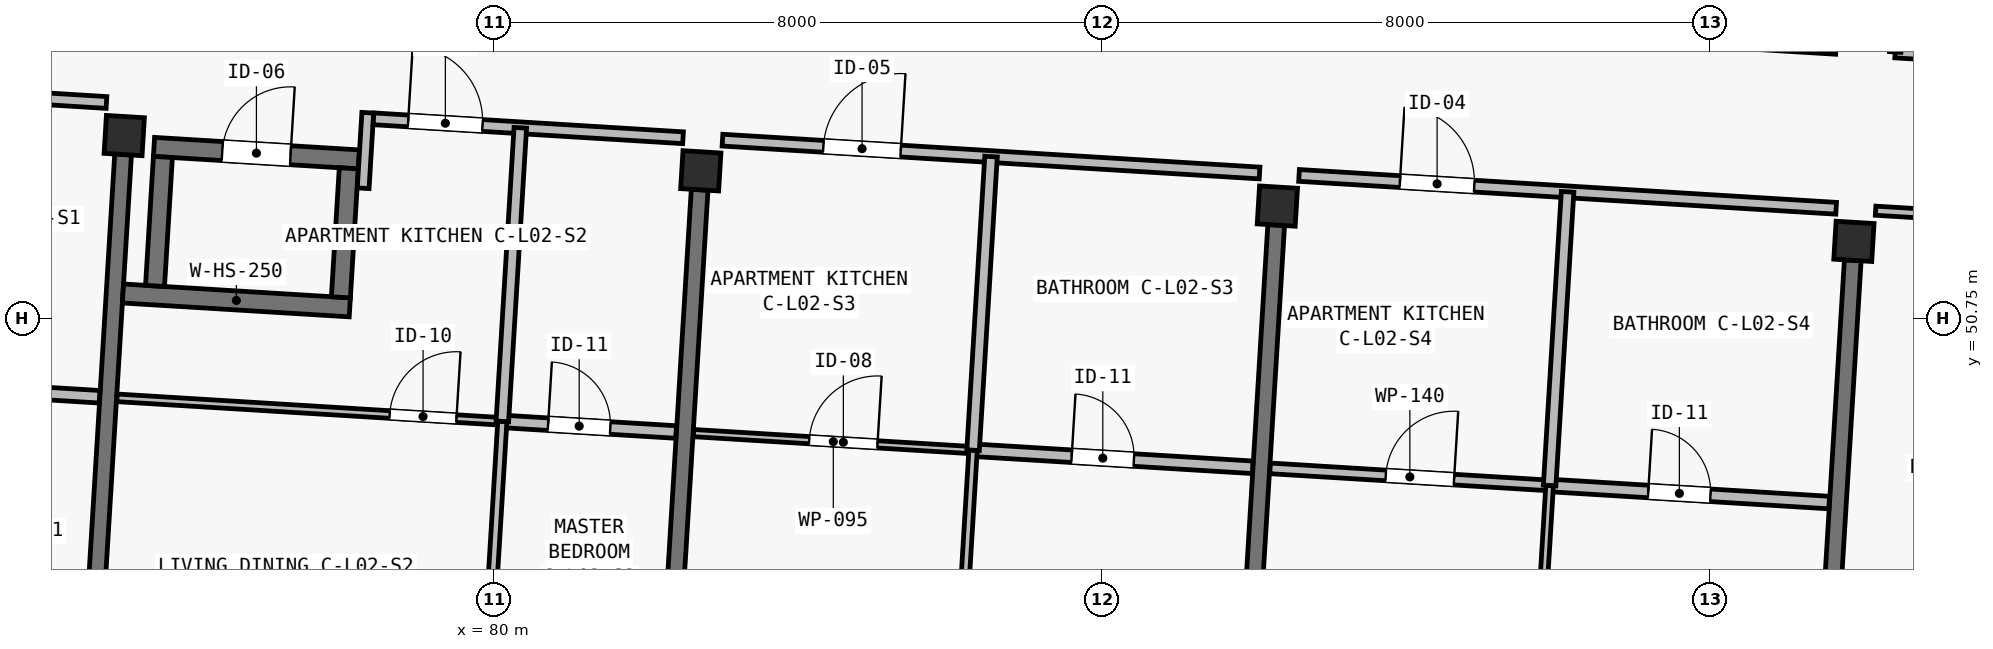
"""IFC4 building model, lengths in metres.
Left out: names, types, materials, properties, quantities, classifications, styles, units other than length and angle.
Written with IfcOpenShell. Run it as: python <this file> out.ifc"""

import sys

from ifc_helpers import new_model, si_unit, direction, frame, frame_2d, origin, origin_2d, place, context, subcontext, project, spatial, rectangle, extrude, element, fill, save


model = new_model("IFC4")
c1 = context("Model", 3, precision=1e-05, world=origin(), true_north=direction((0.0, 1.0)))
c2 = subcontext(c1, "Body", "Model", "MODEL_VIEW")
j1 = project(units=[si_unit("LENGTHUNIT", "METRE"), si_unit("PLANEANGLEUNIT", "RADIAN")], contexts=[c1])
p1 = place(None, origin())
s1 = spatial("IfcSite", under=j1, at=p1, CompositionType="ELEMENT")
p2 = place(p1, origin())
s2 = spatial("IfcBuilding", under=s1, at=p2, CompositionType="ELEMENT")
p3 = place(p2, frame((0.0, 0.0, 8.4)))
s3 = spatial("IfcBuildingStorey", under=s2, at=p3, CompositionType="ELEMENT", Elevation=8.4)
for number, where, z_axis, x_axis in (
    (1, (75.135, 53.158, 0.0), (0.0, 0.0, 1.0), (0.998, -0.061, 0.0)),
    (2, (82.721, 52.694, 0.0), (0.0, 0.0, 1.0), (0.998, -0.061, 0.0)),
    (3, (90.307, 52.23, 0.0), (0.0, 0.0, 1.0), (0.998, -0.061, 0.0)),
    (4, (97.893, 51.766, 0.0), (0.0, 0.0, 1.0), (0.998, -0.061, 0.0)),
):
    element("IfcColumn", number, at=place(p3, frame(where, z_axis=z_axis, x_axis=x_axis)), inside=s3, PredefinedType="COLUMN", context=c2, shape_type="SweptSolid", body=[
        extrude(rectangle(XDim=0.5, YDim=0.5, at=origin_2d()), origin(), (0.0, 0.0, 1.0), 3.25),
    ])
p4 = place(p3, frame((74.687, 45.822, 0.0), z_axis=(0.0, 0.0, 1.0), x_axis=(0.061033859059, 0.99813569621, 0.0)))
e5 = element("IfcWall", 5, at=p4, inside=s3, PredefinedType="SHEAR", context=c2, shape_type="SweptSolid", body=[
    extrude(rectangle(XDim=7.1, YDim=0.22, at=frame_2d((3.55, 0.0))), origin(), (0.0, 0.0, 1.0), 2.5),
])
p5 = place(p3, frame((82.273, 45.358, 0.0), z_axis=(0.0, 0.0, 1.0), x_axis=(0.061070212127, 0.998133472633, 0.0)))
e6 = element("IfcWall", 6, at=p5, inside=s3, PredefinedType="SHEAR", context=c2, shape_type="SweptSolid", body=[
    extrude(rectangle(XDim=7.1, YDim=0.22, at=frame_2d((3.55, 0.0))), origin(), (0.0, 0.0, 1.0), 2.5),
])
p6 = place(p3, frame((89.859, 44.894, 0.0), z_axis=(0.0, 0.0, 1.0), x_axis=(0.061033859059, 0.99813569621, 0.0)))
e7 = element("IfcWall", 7, at=p6, inside=s3, PredefinedType="SHEAR", context=c2, shape_type="SweptSolid", body=[
    extrude(rectangle(XDim=7.1, YDim=0.22, at=frame_2d((3.55, 0.0))), origin(), (0.0, 0.0, 1.0), 2.5),
])
p7 = place(p3, frame((97.444, 44.43, 0.0), z_axis=(0.0, 0.0, 1.0), x_axis=(0.061070212127, 0.998133472633, 0.0)))
e8 = element("IfcWall", 8, at=p7, inside=s3, PredefinedType="SHEAR", context=c2, shape_type="SweptSolid", body=[
    extrude(rectangle(XDim=7.1, YDim=0.22, at=frame_2d((3.55, 0.0))), origin(), (0.0, 0.0, 1.0), 2.5),
])
p8 = place(p3, frame((75.119, 51.08, 0.0), z_axis=(0.0, 0.0, 1.0), x_axis=(0.998133370443, -0.061071882298, 0.0)))
e9 = element("IfcWall", 9, at=p8, inside=s3, PredefinedType="SHEAR", context=c2, shape_type="SweptSolid", body=[
    extrude(rectangle(XDim=2.99, YDim=0.25, at=frame_2d((1.495, 0.0))), origin(), (0.0, 0.0, 1.0), 3.25),
])
p9 = place(p3, frame((75.527, 53.009, 0.0), z_axis=(0.0, 0.0, 1.0), x_axis=(0.998129907752, -0.061128448781, 0.0)))
e10 = element("IfcWall", 10, at=p9, inside=s3, PredefinedType="SHEAR", context=c2, shape_type="SweptSolid", body=[
    extrude(rectangle(XDim=2.7, YDim=0.25, at=frame_2d((1.35, 0.0))), origin(), (0.0, 0.0, 1.0), 3.25),
])
p10 = place(p9, frame((0.9, 0.0, 0.0)))
e11 = element("IfcOpeningElement", 11, at=p10, cuts=e10, PredefinedType="OPENING", context=c2, shape_type="SweptSolid", body=[
    extrude(rectangle(XDim=0.9, YDim=2.05, at=frame_2d((0.45, 1.025))), frame((0.0, 0.14, 0.0), z_axis=(0.0, -1.0, 0.0), x_axis=(1.0, 0.0, 0.0)), (0.0, 0.0, 1.0), 0.28),
])
p11 = place(p3, frame((75.541, 51.179, 0.0), z_axis=(0.0, 0.0, 1.0), x_axis=(0.061037062968, 0.998135500293, 0.0)))
e12 = element("IfcWall", 12, at=p11, inside=s3, PredefinedType="SHEAR", context=c2, shape_type="SweptSolid", body=[
    extrude(rectangle(XDim=1.7, YDim=0.25, at=frame_2d((0.85, 0.0))), origin(), (0.0, 0.0, 1.0), 3.25),
])
p12 = place(p3, frame((77.986, 51.03, 0.0), z_axis=(0.0, 0.0, 1.0), x_axis=(0.061028314627, 0.998136035225, 0.0)))
e13 = element("IfcWall", 13, at=p12, inside=s3, PredefinedType="SHEAR", context=c2, shape_type="SweptSolid", body=[
    extrude(rectangle(XDim=1.7, YDim=0.25, at=frame_2d((0.85, 0.0))), origin(), (0.0, 0.0, 1.0), 3.25),
])
p13 = place(p3, frame((67.835, 54.025, 0.0), z_axis=(0.0, 0.0, 1.0), x_axis=(0.998135666539, -0.061034344288, 0.0)))
e14 = element("IfcWall", 14, at=p13, inside=s3, PredefinedType="PARTITIONING", context=c2, shape_type="SweptSolid", body=[
    extrude(rectangle(XDim=7.08, YDim=0.155, at=frame_2d((3.54, 0.0))), origin(), (0.0, 0.0, 1.0), 2.97),
])
p14 = place(p13, frame((1.33, 0.0, 0.0)))
e15 = element("IfcOpeningElement", 15, at=p14, cuts=e14, PredefinedType="OPENING", context=c2, shape_type="SweptSolid", body=[
    extrude(rectangle(XDim=0.98, YDim=2.15, at=frame_2d((0.49, 1.075))), frame((0.0, 0.093, 0.0), z_axis=(0.0, -1.0, 0.0), x_axis=(1.0, 0.0, 0.0)), (0.0, 0.0, 1.0), 0.185),
])
p15 = place(p3, frame((71.132, 49.946, 0.0), z_axis=(0.0, 0.0, 1.0), x_axis=(0.998136719672, -0.061017119263, 0.0)))
e16 = element("IfcWall", 16, at=p15, inside=s3, PredefinedType="PLUMBINGWALL", context=c2, shape_type="SweptSolid", body=[
    extrude(rectangle(XDim=3.685, YDim=0.165, at=frame_2d((1.843, 0.0))), origin(), (0.0, 0.0, 1.0), 2.97),
])
p16 = place(p15, frame((1.3, 0.0, 0.0)))
e17 = element("IfcOpeningElement", 17, at=p16, cuts=e16, PredefinedType="OPENING", context=c2, shape_type="SweptSolid", body=[
    extrude(rectangle(XDim=0.82, YDim=2.08, at=frame_2d((0.41, 1.04))), frame((0.0, 0.097, 0.0), z_axis=(0.0, -1.0, 0.0), x_axis=(1.0, 0.0, 0.0)), (0.0, 0.0, 1.0), 0.195),
])
p17 = place(p3, frame((78.279, 52.465, 0.0), z_axis=(0.0, 0.0, 1.0), x_axis=(0.061095097219, 0.998131949742, 0.0)))
e18 = element("IfcWall", 18, at=p17, inside=s3, PredefinedType="PARTITIONING", context=c2, shape_type="SweptSolid", body=[
    extrude(rectangle(XDim=0.995, YDim=0.155, at=frame_2d((0.498, 0.0))), origin(), (0.0, 0.0, 1.0), 2.97),
])
p18 = place(p3, frame((78.415, 53.378, 0.0), z_axis=(0.0, 0.0, 1.0), x_axis=(0.998131852862, -0.061096679962, 0.0)))
e19 = element("IfcWall", 19, at=p18, inside=s3, PredefinedType="PARTITIONING", context=c2, shape_type="SweptSolid", body=[
    extrude(rectangle(XDim=4.08, YDim=0.155, at=frame_2d((2.04, 0.0))), origin(), (0.0, 0.0, 1.0), 2.97),
])
p19 = place(p18, frame((0.457, 0.0, 0.0)))
e20 = element("IfcOpeningElement", 20, at=p19, cuts=e19, PredefinedType="OPENING", context=c2, shape_type="SweptSolid", body=[
    extrude(rectangle(XDim=0.98, YDim=2.15, at=frame_2d((0.49, 1.075))), frame((0.0, 0.093, 0.0), z_axis=(0.0, -1.0, 0.0), x_axis=(1.0, 0.0, 0.0)), (0.0, 0.0, 1.0), 0.185),
])
p20 = place(p3, frame((75.04, 49.707, 0.0), z_axis=(0.0, 0.0, 1.0), x_axis=(0.998135637207, -0.061034823981, 0.0)))
e21 = element("IfcWall", 21, at=p20, inside=s3, PredefinedType="PARTITIONING", context=c2, shape_type="SweptSolid", body=[
    extrude(rectangle(XDim=5.08, YDim=0.1, at=frame_2d((2.54, 0.0))), origin(), (0.0, 0.0, 1.0), 2.97),
])
p21 = place(p20, frame((3.595, 0.0, 0.0)))
e22 = element("IfcOpeningElement", 22, at=p21, cuts=e21, PredefinedType="OPENING", context=c2, shape_type="SweptSolid", body=[
    extrude(rectangle(XDim=0.88, YDim=2.1, at=frame_2d((0.44, 1.05))), frame((0.0, 0.065, 0.0), z_axis=(0.0, -1.0, 0.0), x_axis=(1.0, 0.0, 0.0)), (0.0, 0.0, 1.0), 0.13),
])
p22 = place(p3, frame((80.11, 49.397, 0.0), z_axis=(0.0, 0.0, 1.0), x_axis=(0.99813222782, -0.061090553999, 0.0)))
e23 = element("IfcWall", 23, at=p22, inside=s3, PredefinedType="PLUMBINGWALL", context=c2, shape_type="SweptSolid", body=[
    extrude(rectangle(XDim=2.29, YDim=0.165, at=frame_2d((1.145, 0.0))), origin(), (0.0, 0.0, 1.0), 2.97),
])
p23 = place(p22, frame((0.603, 0.0, 0.0)))
e24 = element("IfcOpeningElement", 24, at=p23, cuts=e23, PredefinedType="OPENING", context=c2, shape_type="SweptSolid", body=[
    extrude(rectangle(XDim=0.82, YDim=2.08, at=frame_2d((0.41, 1.04))), frame((0.0, 0.097, 0.0), z_axis=(0.0, -1.0, 0.0), x_axis=(1.0, 0.0, 0.0)), (0.0, 0.0, 1.0), 0.195),
])
p24 = place(p3, frame((79.833, 44.866, 0.0), z_axis=(0.0, 0.0, 1.0), x_axis=(0.061035713941, 0.998135582786, 0.0)))
e25 = element("IfcWall", 25, at=p24, inside=s3, PredefinedType="PARTITIONING", context=c2, shape_type="SweptSolid", body=[
    extrude(rectangle(XDim=4.54, YDim=0.12, at=frame_2d((2.27, 0.0))), origin(), (0.0, 0.0, 1.0), 2.97),
])
p25 = place(p24, frame((1.35, 0.0, 0.0)))
e26 = element("IfcOpeningElement", 26, at=p25, cuts=e25, PredefinedType="OPENING", context=c2, shape_type="SweptSolid", body=[
    extrude(rectangle(XDim=0.9, YDim=2.1, at=frame_2d((0.45, 1.05))), frame((0.0, 0.075, 0.0), z_axis=(0.0, -1.0, 0.0), x_axis=(1.0, 0.0, 0.0)), (0.0, 0.0, 1.0), 0.15),
])
p26 = place(p3, frame((80.11, 49.397, 0.0), z_axis=(0.0, 0.0, 1.0), x_axis=(0.061066453301, 0.998133702608, 0.0)))
e27 = element("IfcWall", 27, at=p26, inside=s3, PredefinedType="PLUMBINGWALL", context=c2, shape_type="SweptSolid", body=[
    extrude(rectangle(XDim=3.87, YDim=0.165, at=frame_2d((1.935, 0.0))), origin(), (0.0, 0.0, 1.0), 2.97),
])
p27 = place(p3, frame((83.007, 53.097, 0.0), z_axis=(0.0, 0.0, 1.0), x_axis=(0.998135666539, -0.061034344288, 0.0)))
e28 = element("IfcWall", 28, at=p27, inside=s3, PredefinedType="PARTITIONING", context=c2, shape_type="SweptSolid", body=[
    extrude(rectangle(XDim=7.08, YDim=0.155, at=frame_2d((3.54, 0.0))), origin(), (0.0, 0.0, 1.0), 2.97),
])
p28 = place(p27, frame((1.33, 0.0, 0.0)))
e29 = element("IfcOpeningElement", 29, at=p28, cuts=e28, PredefinedType="OPENING", context=c2, shape_type="SweptSolid", body=[
    extrude(rectangle(XDim=1.02, YDim=2.2, at=frame_2d((0.51, 1.1))), frame((0.0, 0.093, 0.0), z_axis=(0.0, -1.0, 0.0), x_axis=(1.0, 0.0, 0.0)), (0.0, 0.0, 1.0), 0.185),
])
p29 = place(p3, frame((82.625, 49.243, 0.0), z_axis=(0.0, 0.0, 1.0), x_axis=(0.998132682596, -0.061083123148, 0.0)))
e30 = element("IfcWall", 30, at=p29, inside=s3, PredefinedType="PARTITIONING", context=c2, shape_type="SweptSolid", body=[
    extrude(rectangle(XDim=3.685, YDim=0.095, at=frame_2d((1.843, 0.0))), origin(), (0.0, 0.0, 1.0), 2.97),
])
p30 = place(p29, frame((1.525, 0.0, 0.0)))
e31 = element("IfcOpeningElement", 31, at=p30, cuts=e30, PredefinedType="OPENING", context=c2, shape_type="SweptSolid", body=[
    extrude(rectangle(XDim=0.9, YDim=2.1, at=frame_2d((0.45, 1.05))), frame((0.0, 0.062, 0.0), z_axis=(0.0, -1.0, 0.0), x_axis=(1.0, 0.0, 0.0)), (0.0, 0.0, 1.0), 0.125),
])
p31 = place(p3, frame((86.304, 49.018, 0.0), z_axis=(0.0, 0.0, 1.0), x_axis=(0.998136719672, -0.061017119263, 0.0)))
e32 = element("IfcWall", 32, at=p31, inside=s3, PredefinedType="PLUMBINGWALL", context=c2, shape_type="SweptSolid", body=[
    extrude(rectangle(XDim=3.685, YDim=0.165, at=frame_2d((1.843, 0.0))), origin(), (0.0, 0.0, 1.0), 2.97),
])
p32 = place(p31, frame((1.3, 0.0, 0.0)))
e33 = element("IfcOpeningElement", 33, at=p32, cuts=e32, PredefinedType="OPENING", context=c2, shape_type="SweptSolid", body=[
    extrude(rectangle(XDim=0.82, YDim=2.08, at=frame_2d((0.41, 1.04))), frame((0.0, 0.097, 0.0), z_axis=(0.0, -1.0, 0.0), x_axis=(1.0, 0.0, 0.0)), (0.0, 0.0, 1.0), 0.195),
])
p33 = place(p3, frame((86.027, 44.487, 0.0), z_axis=(0.0, 0.0, 1.0), x_axis=(0.061035713941, 0.998135582786, 0.0)))
e34 = element("IfcWall", 34, at=p33, inside=s3, PredefinedType="PARTITIONING", context=c2, shape_type="SweptSolid", body=[
    extrude(rectangle(XDim=4.54, YDim=0.11, at=frame_2d((2.27, 0.0))), origin(), (0.0, 0.0, 1.0), 2.97),
])
p34 = place(p33, frame((1.35, 0.0, 0.0)))
e35 = element("IfcOpeningElement", 35, at=p34, cuts=e34, PredefinedType="OPENING", context=c2, shape_type="SweptSolid", body=[
    extrude(rectangle(XDim=0.9, YDim=2.1, at=frame_2d((0.45, 1.05))), frame((0.0, 0.07, 0.0), z_axis=(0.0, -1.0, 0.0), x_axis=(1.0, 0.0, 0.0)), (0.0, 0.0, 1.0), 0.14),
])
p35 = place(p3, frame((86.304, 49.018, 0.0), z_axis=(0.0, 0.0, 1.0), x_axis=(0.061066453301, 0.998133702608, 0.0)))
e36 = element("IfcWall", 36, at=p35, inside=s3, PredefinedType="PLUMBINGWALL", context=c2, shape_type="SweptSolid", body=[
    extrude(rectangle(XDim=3.87, YDim=0.165, at=frame_2d((1.935, 0.0))), origin(), (0.0, 0.0, 1.0), 2.97),
])
p36 = place(p3, frame((90.593, 52.633, 0.0), z_axis=(0.0, 0.0, 1.0), x_axis=(0.998135538078, -0.061036445065, 0.0)))
e37 = element("IfcWall", 37, at=p36, inside=s3, PredefinedType="PARTITIONING", context=c2, shape_type="SweptSolid", body=[
    extrude(rectangle(XDim=7.08, YDim=0.155, at=frame_2d((3.54, 0.0))), origin(), (0.0, 0.0, 1.0), 2.97),
])
p37 = place(p36, frame((1.33, 0.0, 0.0)))
e38 = element("IfcOpeningElement", 38, at=p37, cuts=e37, PredefinedType="OPENING", context=c2, shape_type="SweptSolid", body=[
    extrude(rectangle(XDim=0.98, YDim=2.15, at=frame_2d((0.49, 1.075))), frame((0.0, 0.093, 0.0), z_axis=(0.0, -1.0, 0.0), x_axis=(1.0, 0.0, 0.0)), (0.0, 0.0, 1.0), 0.185),
])
p38 = place(p3, frame((90.211, 48.779, 0.0), z_axis=(0.0, 0.0, 1.0), x_axis=(0.998136719672, -0.061017119263, 0.0)))
e39 = element("IfcWall", 39, at=p38, inside=s3, PredefinedType="PARTITIONING", context=c2, shape_type="SweptSolid", body=[
    extrude(rectangle(XDim=3.685, YDim=0.14, at=frame_2d((1.843, 0.0))), origin(), (0.0, 0.0, 1.0), 2.97),
])
p39 = place(p38, frame((1.525, 0.0, 0.0)))
e40 = element("IfcOpeningElement", 40, at=p39, cuts=e39, PredefinedType="OPENING", context=c2, shape_type="SweptSolid", body=[
    extrude(rectangle(XDim=0.9, YDim=2.1, at=frame_2d((0.45, 1.05))), frame((0.0, 0.085, 0.0), z_axis=(0.0, -1.0, 0.0), x_axis=(1.0, 0.0, 0.0)), (0.0, 0.0, 1.0), 0.17),
])
p40 = place(p3, frame((93.89, 48.554, 0.0), z_axis=(0.0, 0.0, 1.0), x_axis=(0.99813243538, -0.061087162657, 0.0)))
e41 = element("IfcWall", 41, at=p40, inside=s3, PredefinedType="PLUMBINGWALL", context=c2, shape_type="SweptSolid", body=[
    extrude(rectangle(XDim=3.685, YDim=0.165, at=frame_2d((1.842, 0.0))), origin(), (0.0, 0.0, 1.0), 2.97),
])
p41 = place(p40, frame((1.3, 0.0, 0.0)))
e42 = element("IfcOpeningElement", 42, at=p41, cuts=e41, PredefinedType="OPENING", context=c2, shape_type="SweptSolid", body=[
    extrude(rectangle(XDim=0.82, YDim=2.08, at=frame_2d((0.41, 1.04))), frame((0.0, 0.097, 0.0), z_axis=(0.0, -1.0, 0.0), x_axis=(1.0, 0.0, 0.0)), (0.0, 0.0, 1.0), 0.195),
])
p42 = place(p3, frame((93.612, 44.023, 0.0), z_axis=(0.0, 0.0, 1.0), x_axis=(0.061089289302, 0.998132305224, 0.0)))
e43 = element("IfcWall", 43, at=p42, inside=s3, PredefinedType="PARTITIONING", context=c2, shape_type="SweptSolid", body=[
    extrude(rectangle(XDim=4.54, YDim=0.1, at=frame_2d((2.27, 0.0))), origin(), (0.0, 0.0, 1.0), 2.97),
])
p43 = place(p42, frame((1.35, 0.0, 0.0)))
e44 = element("IfcOpeningElement", 44, at=p43, cuts=e43, PredefinedType="OPENING", context=c2, shape_type="SweptSolid", body=[
    extrude(rectangle(XDim=0.88, YDim=2.1, at=frame_2d((0.44, 1.05))), frame((0.0, 0.065, 0.0), z_axis=(0.0, -1.0, 0.0), x_axis=(1.0, 0.0, 0.0)), (0.0, 0.0, 1.0), 0.13),
])
p44 = place(p3, frame((93.89, 48.554, 0.0), z_axis=(0.0, 0.0, 1.0), x_axis=(0.06100360301, 0.998137545842, 0.0)))
e45 = element("IfcWall", 45, at=p44, inside=s3, PredefinedType="PLUMBINGWALL", context=c2, shape_type="SweptSolid", body=[
    extrude(rectangle(XDim=3.87, YDim=0.165, at=frame_2d((1.935, 0.0))), origin(), (0.0, 0.0, 1.0), 2.97),
])
p45 = place(p3, frame((98.178, 52.169, 0.0), z_axis=(0.0, 0.0, 1.0), x_axis=(0.998132468034, -0.061086629106, 0.0)))
e46 = element("IfcWall", 46, at=p45, inside=s3, PredefinedType="PARTITIONING", context=c2, shape_type="SweptSolid", body=[
    extrude(rectangle(XDim=4.66, YDim=0.12, at=frame_2d((2.33, 0.0))), origin(), (0.0, 0.0, 1.0), 2.97),
])
p46 = place(p45, frame((1.15, 0.0, 0.0)))
e47 = element("IfcOpeningElement", 47, at=p46, cuts=e46, PredefinedType="OPENING", context=c2, shape_type="SweptSolid", body=[
    extrude(rectangle(XDim=1.15, YDim=2.15, at=frame_2d((0.575, 1.075))), frame((0.0, 0.075, 0.0), z_axis=(0.0, -1.0, 0.0), x_axis=(1.0, 0.0, 0.0)), (0.0, 0.0, 1.0), 0.15),
])
p47 = place(p3, frame((90.85, 54.721, 0.0), z_axis=(0.0, 0.0, 1.0), x_axis=(0.998135665032, -0.06103436893, 0.0)))
e48 = element("IfcWall", 48, at=p47, inside=s3, PredefinedType="PARTITIONING", context=c2, shape_type="SweptSolid", body=[
    extrude(rectangle(XDim=6.82, YDim=0.155, at=frame_2d((3.41, 0.0))), origin(), (0.0, 0.0, 1.0), 2.97),
])
p48 = place(p47, frame((1.205, 0.0, 0.0)))
e49 = element("IfcOpeningElement", 49, at=p48, cuts=e48, PredefinedType="OPENING", context=c2, shape_type="SweptSolid", body=[
    extrude(rectangle(XDim=0.98, YDim=2.15, at=frame_2d((0.49, 1.075))), frame((0.0, 0.093, 0.0), z_axis=(0.0, -1.0, 0.0), x_axis=(1.0, 0.0, 0.0)), (0.0, 0.0, 1.0), 0.185),
])
p49 = place(p3, frame((98.436, 54.258, 0.0), z_axis=(0.0, 0.0, 1.0), x_axis=(0.998133350094, -0.061072214879, 0.0)))
e50 = element("IfcWall", 50, at=p49, inside=s3, PredefinedType="PARTITIONING", context=c2, shape_type="SweptSolid", body=[
    extrude(rectangle(XDim=6.82, YDim=0.155, at=frame_2d((3.41, 0.0))), origin(), (0.0, 0.0, 1.0), 2.97),
])
p50 = place(p49, frame((1.205, 0.0, 0.0)))
e51 = element("IfcOpeningElement", 51, at=p50, cuts=e50, PredefinedType="OPENING", context=c2, shape_type="SweptSolid", body=[
    extrude(rectangle(XDim=1.02, YDim=2.2, at=frame_2d((0.51, 1.1))), frame((0.0, 0.093, 0.0), z_axis=(0.0, -1.0, 0.0), x_axis=(1.0, 0.0, 0.0)), (0.0, 0.0, 1.0), 0.185),
])
p51 = place(p3, frame((98.436, 54.258, 0.0), z_axis=(0.0, 0.0, 1.0), x_axis=(0.061047700465, 0.998134849741, 0.0)))
e52 = element("IfcWall", 52, at=p51, inside=s3, PredefinedType="PARTITIONING", context=c2, shape_type="SweptSolid", body=[
    extrude(rectangle(XDim=9.87, YDim=0.15, at=frame_2d((4.935, 0.0))), origin(), (0.0, 0.0, 1.0), 2.97),
])
p52 = place(p19, origin())
e53 = element("IfcDoor", 53, at=p52, inside=s3, OperationType="SINGLE_SWING_LEFT", PredefinedType="DOOR", context=c2, shape_type="SweptSolid", body=[
    extrude(rectangle(XDim=0.98, YDim=2.15, at=frame_2d((0.49, 1.075))), frame((0.0, 0.025, 0.0), z_axis=(0.0, -1.0, 0.0), x_axis=(1.0, 0.0, 0.0)), (0.0, 0.0, 1.0), 0.05),
])
fill(e20, e53)
p53 = place(p21, origin())
e54 = element("IfcDoor", 54, at=p53, inside=s3, OperationType="SINGLE_SWING_RIGHT", PredefinedType="DOOR", context=c2, shape_type="SweptSolid", body=[
    extrude(rectangle(XDim=0.88, YDim=2.1, at=frame_2d((0.44, 1.05))), frame((0.0, 0.025, 0.0), z_axis=(0.0, -1.0, 0.0), x_axis=(1.0, 0.0, 0.0)), (0.0, 0.0, 1.0), 0.05),
])
fill(e22, e54)
p54 = place(p23, origin())
e55 = element("IfcDoor", 55, at=p54, inside=s3, OperationType="SINGLE_SWING_LEFT", PredefinedType="DOOR", context=c2, shape_type="SweptSolid", body=[
    extrude(rectangle(XDim=0.82, YDim=2.08, at=frame_2d((0.41, 1.04))), frame((0.0, 0.025, 0.0), z_axis=(0.0, -1.0, 0.0), x_axis=(1.0, 0.0, 0.0)), (0.0, 0.0, 1.0), 0.05),
])
fill(e24, e55)
p55 = place(p28, origin())
e56 = element("IfcDoor", 56, at=p55, inside=s3, OperationType="SINGLE_SWING_RIGHT", PredefinedType="DOOR", context=c2, shape_type="SweptSolid", body=[
    extrude(rectangle(XDim=1.02, YDim=2.2, at=frame_2d((0.51, 1.1))), frame((0.0, 0.025, 0.0), z_axis=(0.0, -1.0, 0.0), x_axis=(1.0, 0.0, 0.0)), (0.0, 0.0, 1.0), 0.05),
])
fill(e29, e56)
p56 = place(p30, origin())
e57 = element("IfcDoor", 57, at=p56, inside=s3, OperationType="SINGLE_SWING_RIGHT", PredefinedType="DOOR", context=c2, shape_type="SweptSolid", body=[
    extrude(rectangle(XDim=0.9, YDim=2.1, at=frame_2d((0.45, 1.05))), frame((0.0, 0.025, 0.0), z_axis=(0.0, -1.0, 0.0), x_axis=(1.0, 0.0, 0.0)), (0.0, 0.0, 1.0), 0.05),
])
fill(e31, e57)
p57 = place(p32, origin())
e58 = element("IfcDoor", 58, at=p57, inside=s3, OperationType="SINGLE_SWING_LEFT", PredefinedType="DOOR", context=c2, shape_type="SweptSolid", body=[
    extrude(rectangle(XDim=0.82, YDim=2.08, at=frame_2d((0.41, 1.04))), frame((0.0, 0.025, 0.0), z_axis=(0.0, -1.0, 0.0), x_axis=(1.0, 0.0, 0.0)), (0.0, 0.0, 1.0), 0.05),
])
fill(e33, e58)
p58 = place(p37, origin())
e59 = element("IfcDoor", 59, at=p58, inside=s3, OperationType="SINGLE_SWING_LEFT", PredefinedType="DOOR", context=c2, shape_type="SweptSolid", body=[
    extrude(rectangle(XDim=0.98, YDim=2.15, at=frame_2d((0.49, 1.075))), frame((0.0, 0.025, 0.0), z_axis=(0.0, -1.0, 0.0), x_axis=(1.0, 0.0, 0.0)), (0.0, 0.0, 1.0), 0.05),
])
fill(e38, e59)
p59 = place(p39, origin())
e60 = element("IfcDoor", 60, at=p59, inside=s3, OperationType="SINGLE_SWING_RIGHT", PredefinedType="DOOR", context=c2, shape_type="SweptSolid", body=[
    extrude(rectangle(XDim=0.9, YDim=2.1, at=frame_2d((0.45, 1.05))), frame((0.0, 0.025, 0.0), z_axis=(0.0, -1.0, 0.0), x_axis=(1.0, 0.0, 0.0)), (0.0, 0.0, 1.0), 0.05),
])
fill(e40, e60)
p60 = place(p41, origin())
e61 = element("IfcDoor", 61, at=p60, inside=s3, OperationType="SINGLE_SWING_LEFT", PredefinedType="DOOR", context=c2, shape_type="SweptSolid", body=[
    extrude(rectangle(XDim=0.82, YDim=2.08, at=frame_2d((0.41, 1.04))), frame((0.0, 0.025, 0.0), z_axis=(0.0, -1.0, 0.0), x_axis=(1.0, 0.0, 0.0)), (0.0, 0.0, 1.0), 0.05),
])
fill(e42, e61)
p61 = place(p10, origin())
e62 = element("IfcDoor", 62, at=p61, inside=s3, OperationType="SINGLE_SWING_RIGHT", PredefinedType="DOOR", context=c2, shape_type="SweptSolid", body=[
    extrude(rectangle(XDim=0.9, YDim=2.05, at=frame_2d((0.45, 1.025))), frame((0.0, 0.025, 0.0), z_axis=(0.0, -1.0, 0.0), x_axis=(1.0, 0.0, 0.0)), (0.0, 0.0, 1.0), 0.05),
])
fill(e11, e62)
save(model, sys.argv[1])
